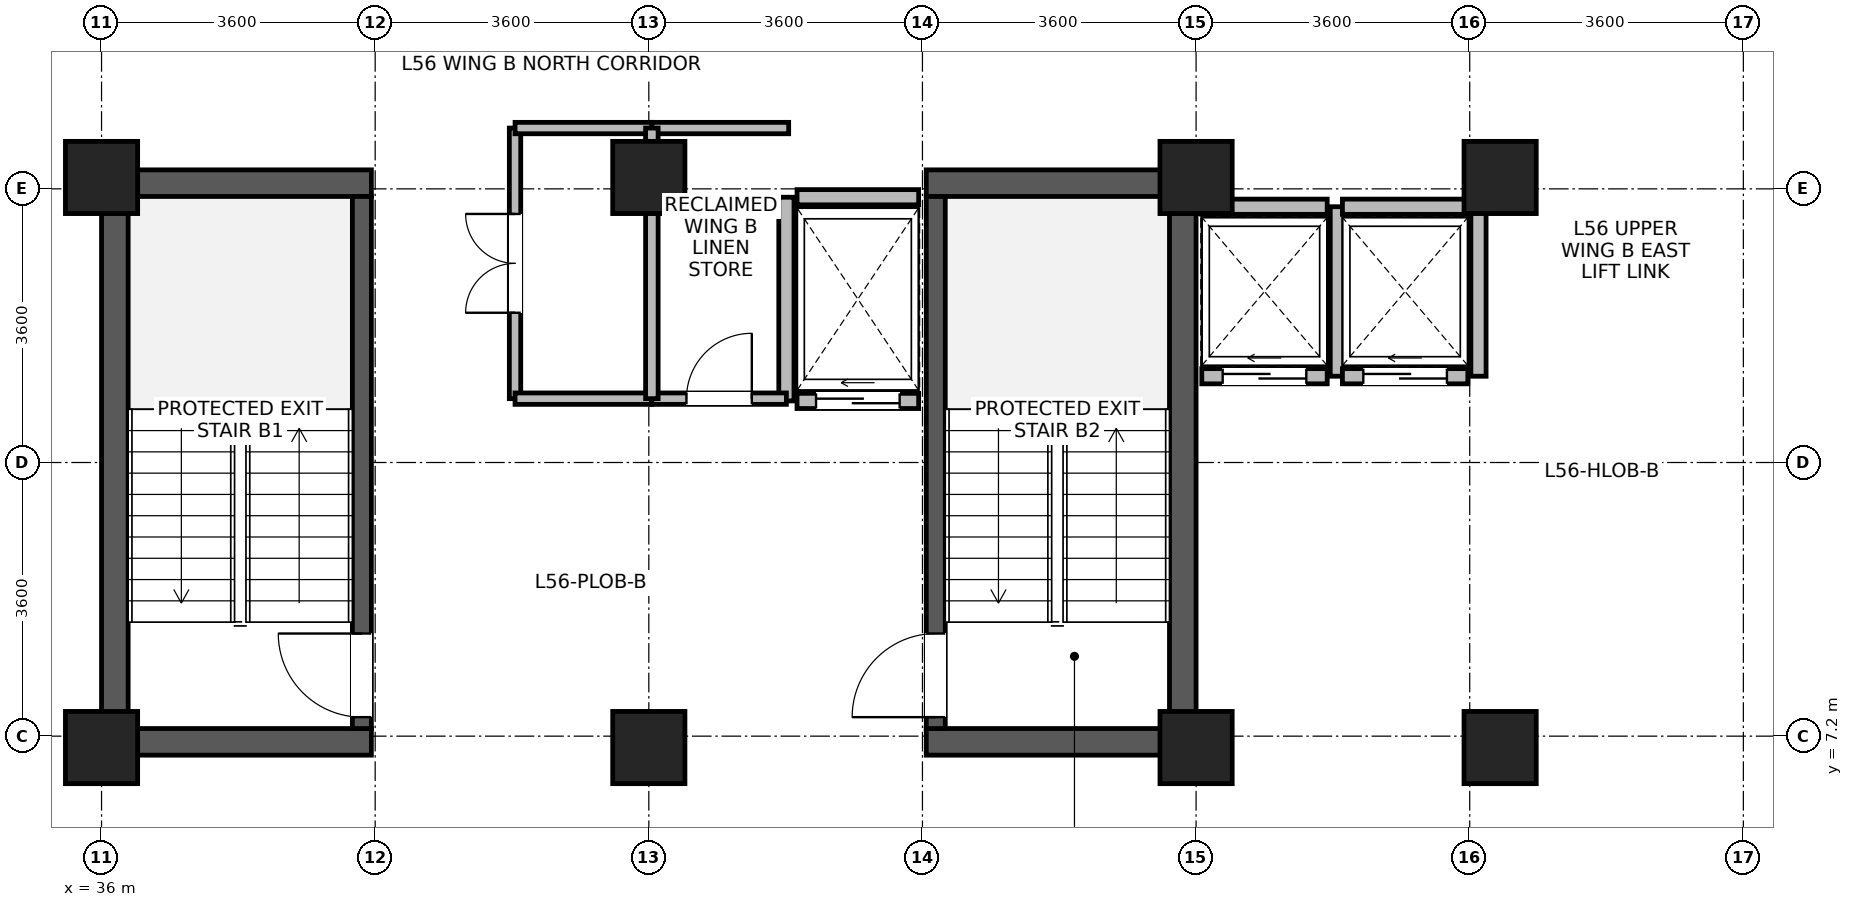
"""IFC4 building model, lengths in metres.
Left out: names, types, materials, properties, quantities, classifications, styles, units other than length and angle.
Written with IfcOpenShell. Run it as: python <this file> out.ifc"""

import sys

from ifc_helpers import new_model, si_unit, direction, frame, frame_2d, origin, origin_2d, place, context, subcontext, project, spatial, rectangle, extrude, source, transform, mapped, element, fill, save


model = new_model("IFC4")
c1 = context("Model", 3, precision=1e-05, world=origin(), true_north=direction((0.0, 1.0)))
c2 = subcontext(c1, "Body", "Model", "MODEL_VIEW")
j1 = project(units=[si_unit("LENGTHUNIT", "METRE"), si_unit("PLANEANGLEUNIT", "RADIAN")], contexts=[c1])
p1 = place(None, origin())
s1 = spatial("IfcSite", under=j1, at=p1, CompositionType="ELEMENT")
p2 = place(p1, origin())
s2 = spatial("IfcBuilding", under=s1, at=p2, CompositionType="ELEMENT")
p3 = place(p2, frame((0.0, 0.0, 220.3)))
s3 = spatial("IfcBuildingStorey", under=s2, at=p3, CompositionType="ELEMENT", Elevation=220.3)
for number, where, z_axis, x_axis in (
    (1, (36.175, 6.95, 0.0), (0.0, 0.0, 1.0), (0.0, 1.0, 0.0)),
    (2, (50.225, 6.95, 0.0), (0.0, 0.0, 1.0), (0.0, 1.0, 0.0)),
):
    element("IfcWall", number, at=place(p3, frame(where, z_axis=z_axis, x_axis=x_axis)), inside=s3, PredefinedType="SHEAR", context=c2, shape_type="SweptSolid", body=[
        extrude(rectangle(XDim=7.7, YDim=0.35, at=frame_2d((3.85, 0.0))), origin(), (0.0, 0.0, 1.0), 3.47),
    ])
for number, where, z_axis, x_axis in (
    (3, (36.35, 7.125, 0.0), (0.0, 0.0, 1.0), (1.0, 0.0, 0.0)),
    (4, (46.85, 7.125, 0.0), (0.0, 0.0, 1.0), (1.0, 0.0, 0.0)),
    (5, (36.35, 14.475, 0.0), (0.0, 0.0, 1.0), (1.0, 0.0, 0.0)),
    (6, (46.85, 14.475, 0.0), (0.0, 0.0, 1.0), (1.0, 0.0, 0.0)),
):
    element("IfcWall", number, at=place(p3, frame(where, z_axis=z_axis, x_axis=x_axis)), inside=s3, PredefinedType="SHEAR", context=c2, shape_type="SweptSolid", body=[
        extrude(rectangle(XDim=3.2, YDim=0.35, at=frame_2d((1.6, 0.0))), origin(), (0.0, 0.0, 1.0), 3.47),
    ])
p4 = place(p3, frame((39.425, 7.3, 0.0), z_axis=(0.0, 0.0, 1.0), x_axis=(0.0, 1.0, 0.0)))
e7 = element("IfcWall", 7, at=p4, inside=s3, PredefinedType="SHEAR", context=c2, shape_type="SweptSolid", body=[
    extrude(rectangle(XDim=7.0, YDim=0.25, at=frame_2d((3.5, 0.0))), origin(), (0.0, 0.0, 1.0), 3.47),
])
p5 = place(p4, frame((0.15, 0.0, 0.0)))
e8 = element("IfcOpeningElement", 8, at=p5, cuts=e7, PredefinedType="OPENING", context=c2, shape_type="SweptSolid", body=[
    extrude(rectangle(XDim=1.1, YDim=2.08, at=frame_2d((0.55, 1.04))), frame((0.0, 0.135, 0.0), z_axis=(0.0, -1.0, 0.0), x_axis=(1.0, 0.0, 0.0)), (0.0, 0.0, 1.0), 0.27),
])
p6 = place(p3, frame((46.975, 7.3, 0.0), z_axis=(0.0, 0.0, 1.0), x_axis=(0.0, 1.0, 0.0)))
e9 = element("IfcWall", 9, at=p6, inside=s3, PredefinedType="SHEAR", context=c2, shape_type="SweptSolid", body=[
    extrude(rectangle(XDim=7.0, YDim=0.25, at=frame_2d((3.5, 0.0))), origin(), (0.0, 0.0, 1.0), 3.47),
])
p7 = place(p6, frame((0.15, 0.0, 0.0)))
e10 = element("IfcOpeningElement", 10, at=p7, cuts=e9, PredefinedType="OPENING", context=c2, shape_type="SweptSolid", body=[
    extrude(rectangle(XDim=1.1, YDim=2.08, at=frame_2d((0.55, 1.04))), frame((0.0, 0.135, 0.0), z_axis=(0.0, -1.0, 0.0), x_axis=(1.0, 0.0, 0.0)), (0.0, 0.0, 1.0), 0.27),
])
m1 = source(origin(), c2, "Body", "SweptSolid", [
    extrude(rectangle(XDim=0.95, YDim=0.95, at=origin_2d()), origin(), (0.0, 0.0, 1.0), 3.7),
])
for number, where, z_axis, x_axis in (
    (11, (36.0, 7.05, 0.0), (0.0, 0.0, 1.0), (1.0, 0.0, 0.0)),
    (12, (36.0, 14.55, 0.0), (0.0, 0.0, 1.0), (1.0, 0.0, 0.0)),
    (13, (43.2, 7.05, 0.0), (0.0, 0.0, 1.0), (1.0, 0.0, 0.0)),
    (14, (43.2, 14.55, 0.0), (0.0, 0.0, 1.0), (1.0, 0.0, 0.0)),
    (15, (50.4, 7.05, 0.0), (0.0, 0.0, 1.0), (1.0, 0.0, 0.0)),
    (16, (50.4, 14.55, 0.0), (0.0, 0.0, 1.0), (1.0, 0.0, 0.0)),
    (17, (54.4, 7.05, 0.0), (0.0, 0.0, 1.0), (1.0, 0.0, 0.0)),
    (18, (54.4, 14.55, 0.0), (0.0, 0.0, 1.0), (1.0, 0.0, 0.0)),
):
    element("IfcColumn", number, at=place(p3, frame(where, z_axis=z_axis, x_axis=x_axis)), inside=s3, PredefinedType="COLUMN", context=c2, shape_type="MappedRepresentation", body=[
        mapped(m1, transform((0.0, 0.0, 0.0), x_axis=(1.0, 0.0, 0.0), y_axis=(0.0, 1.0, 0.0), z_axis=(0.0, 0.0, 1.0), scale=1.0)),
    ])
p8 = place(p3, frame((50.475, 11.935, 0.0), z_axis=(0.0, 0.0, 1.0), x_axis=(1.0, 0.0, 0.0)))
e19 = element("IfcWall", 19, at=p8, inside=s3, PredefinedType="PARTITIONING", context=c2, shape_type="SweptSolid", body=[
    extrude(rectangle(XDim=1.65, YDim=0.2, at=frame_2d((0.825, 0.0))), origin(), (0.0, 0.0, 1.0), 3.45),
])
p9 = place(p8, frame((0.275, 0.0, 0.0)))
e20 = element("IfcOpeningElement", 20, at=p9, cuts=e19, PredefinedType="OPENING", context=c2, shape_type="SweptSolid", body=[
    extrude(rectangle(XDim=1.1, YDim=2.12, at=frame_2d((0.55, 1.06))), frame((0.0, 0.11, 0.0), z_axis=(0.0, -1.0, 0.0), x_axis=(1.0, 0.0, 0.0)), (0.0, 0.0, 1.0), 0.22),
])
p10 = place(p3, frame((50.475, 14.165, 0.0), z_axis=(0.0, 0.0, 1.0), x_axis=(1.0, 0.0, 0.0)))
e21 = element("IfcWall", 21, at=p10, inside=s3, PredefinedType="PARTITIONING", context=c2, shape_type="SweptSolid", body=[
    extrude(rectangle(XDim=1.65, YDim=0.2, at=frame_2d((0.825, 0.0))), origin(), (0.0, 0.0, 1.0), 3.45),
])
p11 = place(p3, frame((52.265, 11.935, 0.0), z_axis=(0.0, 0.0, 1.0), x_axis=(0.0, 1.0, 0.0)))
e22 = element("IfcWall", 22, at=p11, inside=s3, PredefinedType="PARTITIONING", context=c2, shape_type="SweptSolid", body=[
    extrude(rectangle(XDim=2.23, YDim=0.2, at=frame_2d((1.115, 0.0))), origin(), (0.0, 0.0, 1.0), 3.45),
])
p12 = place(p3, frame((52.325, 11.935, 0.0), z_axis=(0.0, 0.0, 1.0), x_axis=(1.0, 0.0, 0.0)))
e23 = element("IfcWall", 23, at=p12, inside=s3, PredefinedType="PARTITIONING", context=c2, shape_type="SweptSolid", body=[
    extrude(rectangle(XDim=1.65, YDim=0.2, at=frame_2d((0.825, 0.0))), origin(), (0.0, 0.0, 1.0), 3.45),
])
p13 = place(p12, frame((0.275, 0.0, 0.0)))
e24 = element("IfcOpeningElement", 24, at=p13, cuts=e23, PredefinedType="OPENING", context=c2, shape_type="SweptSolid", body=[
    extrude(rectangle(XDim=1.1, YDim=2.12, at=frame_2d((0.55, 1.06))), frame((0.0, 0.11, 0.0), z_axis=(0.0, -1.0, 0.0), x_axis=(1.0, 0.0, 0.0)), (0.0, 0.0, 1.0), 0.22),
])
p14 = place(p3, frame((52.325, 14.165, 0.0), z_axis=(0.0, 0.0, 1.0), x_axis=(1.0, 0.0, 0.0)))
e25 = element("IfcWall", 25, at=p14, inside=s3, PredefinedType="PARTITIONING", context=c2, shape_type="SweptSolid", body=[
    extrude(rectangle(XDim=1.65, YDim=0.2, at=frame_2d((0.825, 0.0))), origin(), (0.0, 0.0, 1.0), 3.45),
])
p15 = place(p3, frame((54.115, 11.935, 0.0), z_axis=(0.0, 0.0, 1.0), x_axis=(0.0, 1.0, 0.0)))
e26 = element("IfcWall", 26, at=p15, inside=s3, PredefinedType="PARTITIONING", context=c2, shape_type="SweptSolid", body=[
    extrude(rectangle(XDim=2.23, YDim=0.2, at=frame_2d((1.115, 0.0))), origin(), (0.0, 0.0, 1.0), 3.45),
])
p16 = place(p3, frame((45.15, 11.61, 0.0), z_axis=(0.0, 0.0, 1.0), x_axis=(1.0, 0.0, 0.0)))
e27 = element("IfcWall", 27, at=p16, inside=s3, PredefinedType="PARTITIONING", context=c2, shape_type="SweptSolid", body=[
    extrude(rectangle(XDim=1.6, YDim=0.2, at=frame_2d((0.8, 0.0))), origin(), (0.0, 0.0, 1.0), 3.45),
])
p17 = place(p16, frame((0.25, 0.0, 0.0)))
e28 = element("IfcOpeningElement", 28, at=p17, cuts=e27, PredefinedType="OPENING", context=c2, shape_type="SweptSolid", body=[
    extrude(rectangle(XDim=1.1, YDim=2.12, at=frame_2d((0.55, 1.06))), frame((0.0, 0.11, 0.0), z_axis=(0.0, -1.0, 0.0), x_axis=(1.0, 0.0, 0.0)), (0.0, 0.0, 1.0), 0.22),
])
p18 = place(p3, frame((45.15, 14.29, 0.0), z_axis=(0.0, 0.0, 1.0), x_axis=(1.0, 0.0, 0.0)))
e29 = element("IfcWall", 29, at=p18, inside=s3, PredefinedType="PARTITIONING", context=c2, shape_type="SweptSolid", body=[
    extrude(rectangle(XDim=1.6, YDim=0.2, at=frame_2d((0.8, 0.0))), origin(), (0.0, 0.0, 1.0), 2.55),
])
p19 = place(p3, frame((45.01, 11.61, 0.0), z_axis=(0.0, 0.0, 1.0), x_axis=(0.0, 1.0, 0.0)))
e30 = element("IfcWall", 30, at=p19, inside=s3, PredefinedType="PARTITIONING", context=c2, shape_type="SweptSolid", body=[
    extrude(rectangle(XDim=2.68, YDim=0.2, at=frame_2d((1.34, 0.0))), origin(), (0.0, 0.0, 1.0), 3.45),
])
p20 = place(p3, frame((41.44, 11.64, 0.0), z_axis=(0.0, 0.0, 1.0), x_axis=(0.0, 1.0, 0.0)))
e31 = element("IfcWall", 31, at=p20, inside=s3, PredefinedType="PARTITIONING", context=c2, shape_type="SweptSolid", body=[
    extrude(rectangle(XDim=3.56, YDim=0.15, at=frame_2d((1.78, 0.0))), origin(), (0.0, 0.0, 1.0), 3.45),
])
p21 = place(p20, frame((1.13, 0.0, 0.0)))
e32 = element("IfcOpeningElement", 32, at=p21, cuts=e31, PredefinedType="OPENING", context=c2, shape_type="SweptSolid", body=[
    extrude(rectangle(XDim=1.3, YDim=2.12, at=frame_2d((0.65, 1.06))), frame((0.0, 0.085, 0.0), z_axis=(0.0, -1.0, 0.0), x_axis=(1.0, 0.0, 0.0)), (0.0, 0.0, 1.0), 0.17),
])
for number, where, z_axis, x_axis in (
    (33, (41.44, 11.64, 0.0), (0.0, 0.0, 1.0), (1.0, 0.0, 0.0)),
    (34, (41.44, 15.2, 0.0), (0.0, 0.0, 1.0), (1.0, 0.0, 0.0)),
):
    element("IfcWall", number, at=place(p3, frame(where, z_axis=z_axis, x_axis=x_axis)), inside=s3, PredefinedType="PARTITIONING", context=c2, shape_type="SweptSolid", body=[
        extrude(rectangle(XDim=1.8, YDim=0.15, at=frame_2d((0.9, 0.0))), origin(), (0.0, 0.0, 1.0), 3.45),
    ])
p22 = place(p3, frame((43.24, 11.64, 0.0), z_axis=(0.0, 0.0, 1.0), x_axis=(1.0, 0.0, 0.0)))
e35 = element("IfcWall", 35, at=p22, inside=s3, PredefinedType="PARTITIONING", context=c2, shape_type="SweptSolid", body=[
    extrude(rectangle(XDim=1.77, YDim=0.15, at=frame_2d((0.885, 0.0))), origin(), (0.0, 0.0, 1.0), 3.45),
])
p23 = place(p22, frame((0.455, 0.0, 0.0)))
e36 = element("IfcOpeningElement", 36, at=p23, cuts=e35, PredefinedType="OPENING", context=c2, shape_type="SweptSolid", body=[
    extrude(rectangle(XDim=0.86, YDim=2.02, at=frame_2d((0.43, 1.01))), frame((0.0, 0.085, 0.0), z_axis=(0.0, -1.0, 0.0), x_axis=(1.0, 0.0, 0.0)), (0.0, 0.0, 1.0), 0.17),
])
p24 = place(p3, frame((43.24, 15.2, 0.0), z_axis=(0.0, 0.0, 1.0), x_axis=(1.0, 0.0, 0.0)))
e37 = element("IfcWall", 37, at=p24, inside=s3, PredefinedType="PARTITIONING", context=c2, shape_type="SweptSolid", body=[
    extrude(rectangle(XDim=1.8, YDim=0.15, at=frame_2d((0.9, 0.0))), origin(), (0.0, 0.0, 1.0), 3.45),
])
p25 = place(p3, frame((43.24, 11.64, 0.0), z_axis=(0.0, 0.0, 1.0), x_axis=(0.0, 1.0, 0.0)))
e38 = element("IfcWall", 38, at=p25, inside=s3, PredefinedType="PARTITIONING", context=c2, shape_type="SweptSolid", body=[
    extrude(rectangle(XDim=3.56, YDim=0.165, at=frame_2d((1.78, 0.0))), origin(), (0.0, 0.0, 1.0), 3.45),
])
p26 = place(p5, origin())
e39 = element("IfcDoor", 39, at=p26, inside=s3, OperationType="SINGLE_SWING_RIGHT", PredefinedType="DOOR", context=c2, shape_type="SweptSolid", body=[
    extrude(rectangle(XDim=1.1, YDim=2.08, at=frame_2d((0.55, 1.04))), frame((0.0, 0.025, 0.0), z_axis=(0.0, -1.0, 0.0), x_axis=(1.0, 0.0, 0.0)), (0.0, 0.0, 1.0), 0.05),
])
fill(e8, e39)
p27 = place(p7, origin())
e40 = element("IfcDoor", 40, at=p27, inside=s3, OperationType="SINGLE_SWING_LEFT", PredefinedType="DOOR", context=c2, shape_type="SweptSolid", body=[
    extrude(rectangle(XDim=1.1, YDim=2.08, at=frame_2d((0.55, 1.04))), frame((0.0, 0.025, 0.0), z_axis=(0.0, -1.0, 0.0), x_axis=(1.0, 0.0, 0.0)), (0.0, 0.0, 1.0), 0.05),
])
fill(e10, e40)
p28 = place(p9, origin())
e41 = element("IfcDoor", 41, at=p28, inside=s3, OperationType="SLIDING_TO_LEFT", PredefinedType="DOOR", context=c2, shape_type="SweptSolid", body=[
    extrude(rectangle(XDim=1.1, YDim=2.12, at=frame_2d((0.55, 1.06))), frame((0.0, 0.025, 0.0), z_axis=(0.0, -1.0, 0.0), x_axis=(1.0, 0.0, 0.0)), (0.0, 0.0, 1.0), 0.05),
])
fill(e20, e41)
p29 = place(p13, origin())
e42 = element("IfcDoor", 42, at=p29, inside=s3, OperationType="SLIDING_TO_LEFT", PredefinedType="DOOR", context=c2, shape_type="SweptSolid", body=[
    extrude(rectangle(XDim=1.1, YDim=2.12, at=frame_2d((0.55, 1.06))), frame((0.0, 0.025, 0.0), z_axis=(0.0, -1.0, 0.0), x_axis=(1.0, 0.0, 0.0)), (0.0, 0.0, 1.0), 0.05),
])
fill(e24, e42)
p30 = place(p17, origin())
e43 = element("IfcDoor", 43, at=p30, inside=s3, OperationType="SLIDING_TO_LEFT", PredefinedType="DOOR", context=c2, shape_type="SweptSolid", body=[
    extrude(rectangle(XDim=1.1, YDim=2.12, at=frame_2d((0.55, 1.06))), frame((0.0, 0.025, 0.0), z_axis=(0.0, -1.0, 0.0), x_axis=(1.0, 0.0, 0.0)), (0.0, 0.0, 1.0), 0.05),
])
fill(e28, e43)
p31 = place(p21, origin())
e44 = element("IfcDoor", 44, at=p31, inside=s3, OperationType="DOUBLE_DOOR_SINGLE_SWING", PredefinedType="DOOR", context=c2, shape_type="SweptSolid", body=[
    extrude(rectangle(XDim=1.3, YDim=2.12, at=frame_2d((0.65, 1.06))), frame((0.0, 0.025, 0.0), z_axis=(0.0, -1.0, 0.0), x_axis=(1.0, 0.0, 0.0)), (0.0, 0.0, 1.0), 0.05),
])
fill(e32, e44)
p32 = place(p23, origin())
e45 = element("IfcDoor", 45, at=p32, inside=s3, OperationType="SINGLE_SWING_RIGHT", PredefinedType="DOOR", context=c2, shape_type="SweptSolid", body=[
    extrude(rectangle(XDim=0.86, YDim=2.02, at=frame_2d((0.43, 1.01))), frame((0.0, 0.025, 0.0), z_axis=(0.0, -1.0, 0.0), x_axis=(1.0, 0.0, 0.0)), (0.0, 0.0, 1.0), 0.05),
])
fill(e36, e45)
save(model, sys.argv[1])
